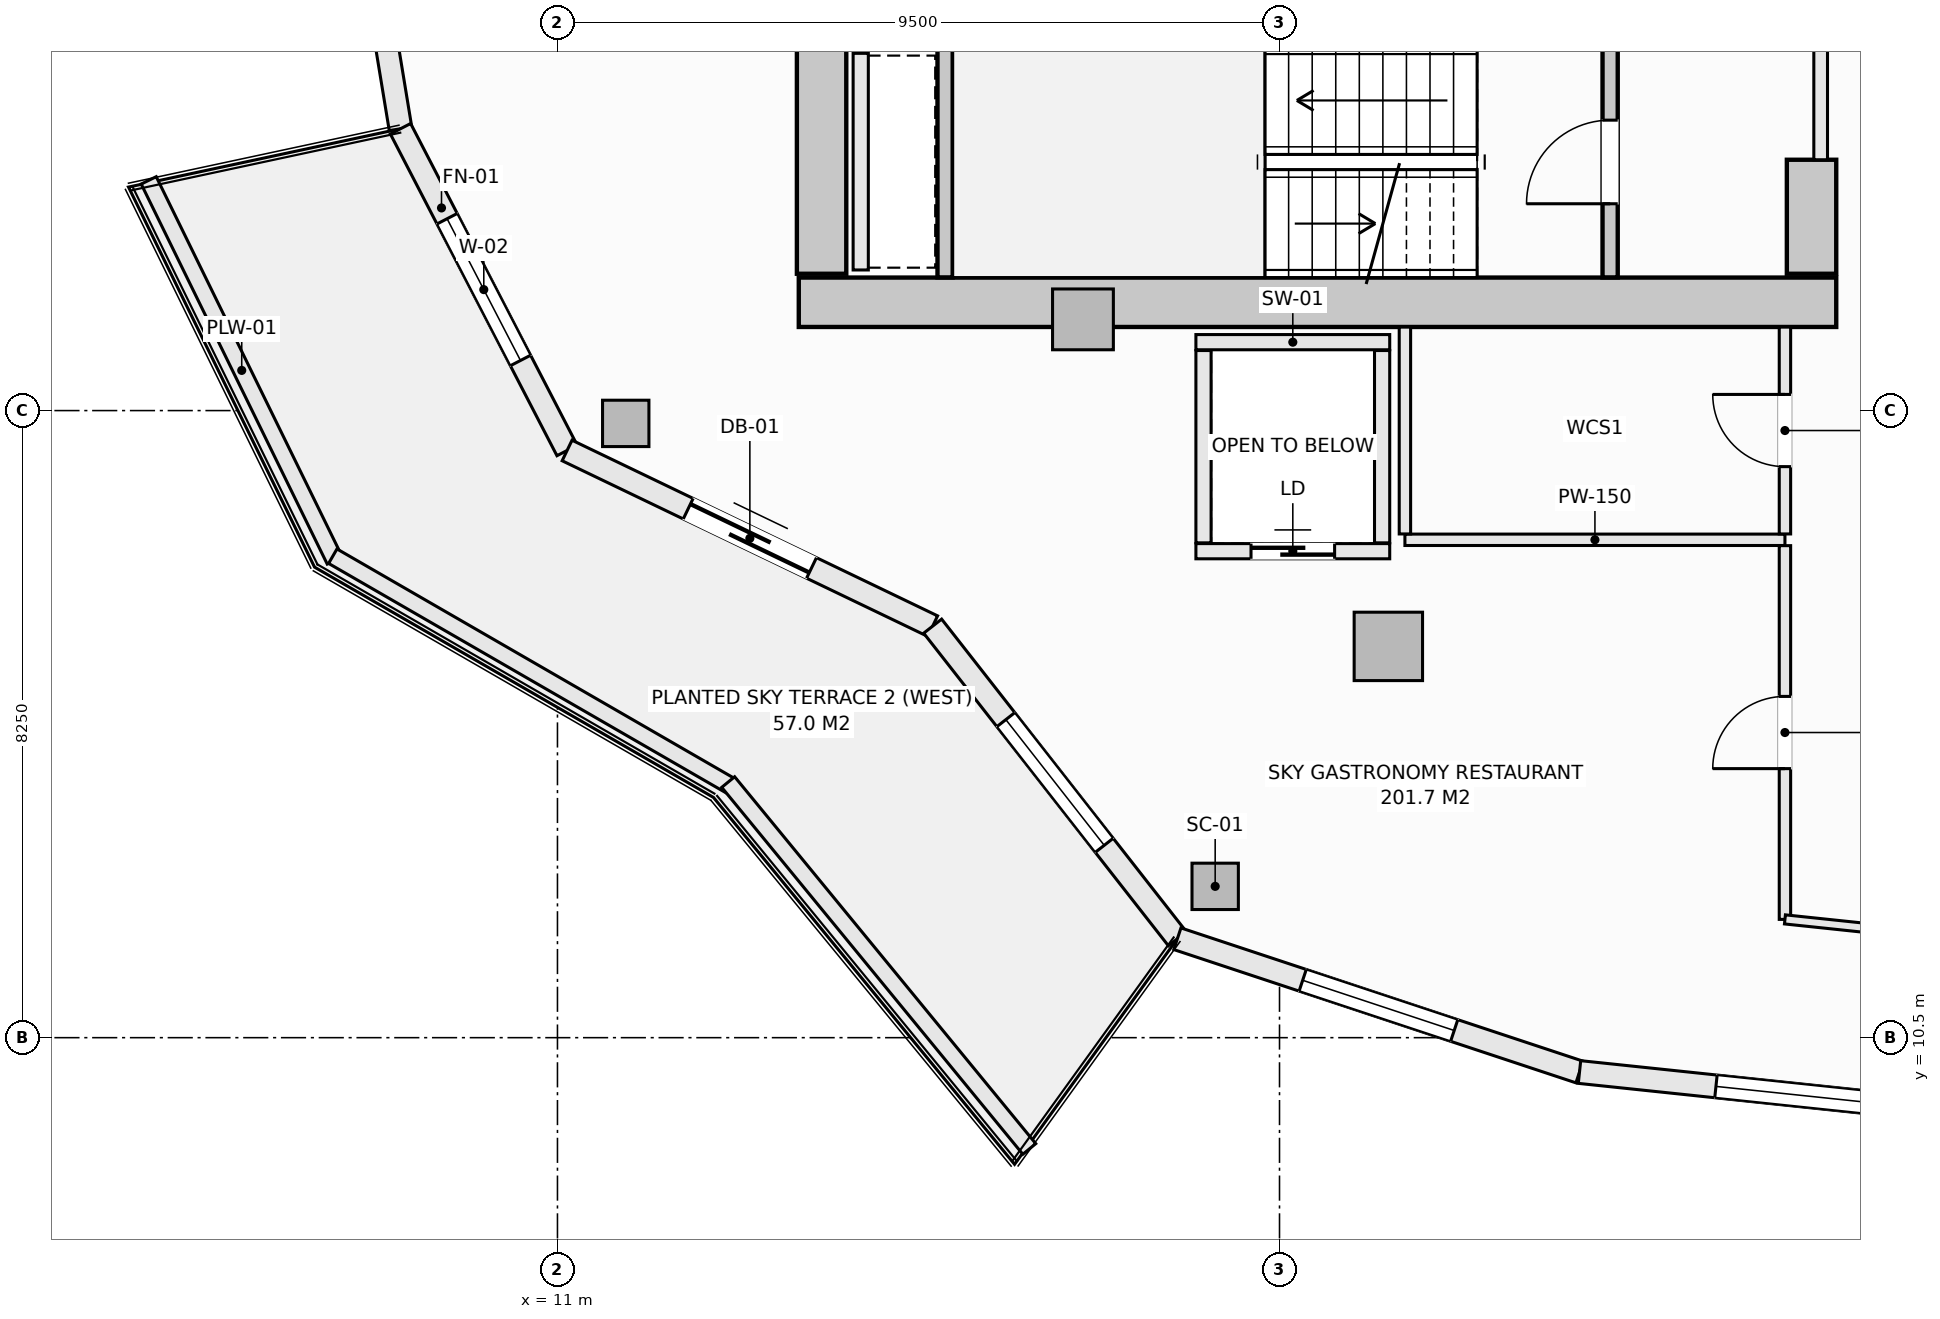
"""IFC4 building model, lengths in metres.
Left out: names, types, materials, properties, quantities, classifications, styles, units other than length and angle.
Written with IfcOpenShell. Run it as: python <this file> out.ifc"""

import sys

from ifc_helpers import new_model, si_unit, direction, frame, frame_2d, origin, origin_2d, place, context, subcontext, project, spatial, rectangle, hollow_rectangle, extrude, element, fill, save


model = new_model("IFC4")
c1 = context("Model", 3, precision=1e-05, world=origin(), true_north=direction((0.0, 1.0)))
c2 = subcontext(c1, "Body", "Model", "MODEL_VIEW")
j1 = project(units=[si_unit("LENGTHUNIT", "METRE"), si_unit("PLANEANGLEUNIT", "RADIAN")], contexts=[c1])
p1 = place(None, origin())
s1 = spatial("IfcSite", under=j1, at=p1, CompositionType="ELEMENT")
p2 = place(p1, origin())
s2 = spatial("IfcBuilding", under=s1, at=p2, CompositionType="ELEMENT")
p3 = place(p2, frame((0.0, 0.0, 180.1)))
s3 = spatial("IfcBuildingStorey", under=s2, at=p3, CompositionType="ELEMENT", Elevation=180.1)
p4 = place(p3, frame((14.175, 20.175, -0.27), z_axis=(0.0, 0.0, 1.0), x_axis=(1.0, 0.0, 0.0)))
e1 = element("IfcWall", 1, at=p4, inside=s3, PredefinedType="SHEAR", context=c2, shape_type="SweptSolid", body=[
    extrude(rectangle(XDim=13.65, YDim=0.65, at=frame_2d((6.825, 0.0))), origin(), (0.0, 0.0, 1.0), 3.4),
])
p5 = place(p3, frame((14.475, 20.55, -0.27), z_axis=(0.0, 0.0, 1.0), x_axis=(0.0, 1.0, 0.0)))
e2 = element("IfcWall", 2, at=p5, inside=s3, PredefinedType="SHEAR", context=c2, shape_type="SweptSolid", body=[
    extrude(rectangle(XDim=12.9, YDim=0.65, at=frame_2d((6.45, 0.0))), origin(), (0.0, 0.0, 1.0), 3.4),
])
p6 = place(p3, frame((27.5, 20.55, -0.27), z_axis=(0.0, 0.0, 1.0), x_axis=(0.0, 1.0, 0.0)))
e3 = element("IfcWall", 3, at=p6, inside=s3, PredefinedType="SHEAR", context=c2, shape_type="SweptSolid", body=[
    extrude(rectangle(XDim=1.5, YDim=0.65, at=frame_2d((0.75, 0.0))), origin(), (0.0, 0.0, 1.0), 3.4),
])
for number, where, z_axis, x_axis in (
    (4, (11.898, 18.581, -0.27), (0.0, 0.0, 1.0), (1.0, 0.0, 0.0)),
    (5, (19.654, 12.49, -0.27), (0.0, 0.0, 1.0), (1.0, 0.0, 0.0)),
):
    element("IfcColumn", number, at=place(p3, frame(where, z_axis=z_axis, x_axis=x_axis)), inside=s3, PredefinedType="COLUMN", context=c2, shape_type="SweptSolid", body=[
        extrude(hollow_rectangle(XDim=0.61, YDim=0.61, WallThickness=0.025, at=origin_2d()), origin(), (0.0, 0.0, 1.0), 3.4),
    ])
p7 = place(p3, frame((21.932, 15.648, -0.27), z_axis=(0.0, 0.0, 1.0), x_axis=(1.0, 0.0, 0.0)))
e6 = element("IfcColumn", 6, at=p7, inside=s3, PredefinedType="COLUMN", context=c2, shape_type="SweptSolid", body=[
    extrude(rectangle(XDim=0.9, YDim=0.9, at=origin_2d()), origin(), (0.0, 0.0, 1.0), 3.4),
])
p8 = place(p3, frame((17.914, 19.95, -0.27), z_axis=(0.0, 0.0, 1.0), x_axis=(1.0, 0.0, 0.0)))
e7 = element("IfcColumn", 7, at=p8, inside=s3, PredefinedType="PILASTER", context=c2, shape_type="SweptSolid", body=[
    extrude(rectangle(XDim=0.8, YDim=0.8, at=origin_2d()), origin(), (0.0, 0.0, 1.0), 3.4),
])
p9 = place(p3, frame((8.188, 27.0, 0.0), z_axis=(0.0, 0.0, 1.0), x_axis=(0.162394765401, -0.986725868806, 0.0)))
e8 = element("IfcWall", 8, at=p9, inside=s3, PredefinedType="SOLIDWALL", context=c2, shape_type="SweptSolid", body=[
    extrude(rectangle(XDim=4.603, YDim=0.3, at=frame_2d((2.302, 0.0))), origin(), (0.0, 0.0, 1.0), 2.653),
])
p10 = place(p9, frame((1.252, 0.0, 0.74)))
e9 = element("IfcOpeningElement", 9, at=p10, cuts=e8, PredefinedType="OPENING", context=c2, shape_type="SweptSolid", body=[
    extrude(rectangle(XDim=2.1, YDim=1.7, at=frame_2d((1.05, 0.85))), frame((0.0, 0.16, 0.0), z_axis=(0.0, -1.0, 0.0), x_axis=(1.0, 0.0, 0.0)), (0.0, 0.0, 1.0), 0.32),
])
p11 = place(p3, frame((8.935, 22.458, 0.0), z_axis=(0.0, 0.0, 1.0), x_axis=(0.459810251451, -0.888017191647, 0.0)))
e10 = element("IfcWall", 10, at=p11, inside=s3, PredefinedType="SOLIDWALL", context=c2, shape_type="SweptSolid", body=[
    extrude(rectangle(XDim=4.766, YDim=0.3, at=frame_2d((2.383, 0.0))), origin(), (0.0, 0.0, 1.0), 2.653),
])
p12 = place(p11, frame((1.333, 0.0, 0.74)))
e11 = element("IfcOpeningElement", 11, at=p12, cuts=e10, PredefinedType="OPENING", context=c2, shape_type="SweptSolid", body=[
    extrude(rectangle(XDim=2.1, YDim=1.7, at=frame_2d((1.05, 0.85))), frame((0.0, 0.16, 0.0), z_axis=(0.0, -1.0, 0.0), x_axis=(1.0, 0.0, 0.0)), (0.0, 0.0, 1.0), 0.32),
])
p13 = place(p3, frame((11.127, 18.225, 0.0), z_axis=(0.0, 0.0, 1.0), x_axis=(0.901353070301, -0.433085029363, 0.0)))
e12 = element("IfcWall", 12, at=p13, inside=s3, PredefinedType="SOLIDWALL", context=c2, shape_type="SweptSolid", body=[
    extrude(rectangle(XDim=5.336, YDim=0.3, at=frame_2d((2.668, 0.0))), origin(), (0.0, 0.0, 1.0), 2.653),
])
p14 = place(p13, frame((1.768, 0.0, 0.0)))
e13 = element("IfcOpeningElement", 13, at=p14, cuts=e12, PredefinedType="OPENING", context=c2, shape_type="SweptSolid", body=[
    extrude(rectangle(XDim=1.8, YDim=2.25, at=frame_2d((0.9, 1.125))), frame((0.0, 0.16, 0.0), z_axis=(0.0, -1.0, 0.0), x_axis=(1.0, 0.0, 0.0)), (0.0, 0.0, 1.0), 0.32),
])
p15 = place(p3, frame((15.937, 15.914, 0.0), z_axis=(0.0, 0.0, 1.0), x_axis=(0.616429245738, -0.787410302828, 0.0)))
e14 = element("IfcWall", 14, at=p15, inside=s3, PredefinedType="SOLIDWALL", context=c2, shape_type="SweptSolid", body=[
    extrude(rectangle(XDim=5.223, YDim=0.3, at=frame_2d((2.612, 0.0))), origin(), (0.0, 0.0, 1.0), 2.653),
])
p16 = place(p15, frame((1.562, 0.0, 0.74)))
e15 = element("IfcOpeningElement", 15, at=p16, cuts=e14, PredefinedType="OPENING", context=c2, shape_type="SweptSolid", body=[
    extrude(rectangle(XDim=2.1, YDim=1.7, at=frame_2d((1.05, 0.85))), frame((0.0, 0.16, 0.0), z_axis=(0.0, -1.0, 0.0), x_axis=(1.0, 0.0, 0.0)), (0.0, 0.0, 1.0), 0.32),
])
p17 = place(p3, frame((19.156, 11.801, 0.0), z_axis=(0.0, 0.0, 1.0), x_axis=(0.949246811547, -0.314532177636, 0.0)))
e16 = element("IfcWall", 16, at=p17, inside=s3, PredefinedType="SOLIDWALL", context=c2, shape_type="SweptSolid", body=[
    extrude(rectangle(XDim=5.574, YDim=0.3, at=frame_2d((2.787, 0.0))), origin(), (0.0, 0.0, 1.0), 2.653),
])
p18 = place(p17, frame((1.737, 0.0, 0.74)))
e17 = element("IfcOpeningElement", 17, at=p18, cuts=e16, PredefinedType="OPENING", context=c2, shape_type="SweptSolid", body=[
    extrude(rectangle(XDim=2.1, YDim=1.7, at=frame_2d((1.05, 0.85))), frame((0.0, 0.16, 0.0), z_axis=(0.0, -1.0, 0.0), x_axis=(1.0, 0.0, 0.0)), (0.0, 0.0, 1.0), 0.32),
])
p19 = place(p3, frame((24.447, 10.048, 0.0), z_axis=(0.0, 0.0, 1.0), x_axis=(0.994496545245, -0.104769372887, 0.0)))
e18 = element("IfcWall", 18, at=p19, inside=s3, PredefinedType="SOLIDWALL", context=c2, shape_type="SweptSolid", body=[
    extrude(rectangle(XDim=5.709, YDim=0.3, at=frame_2d((2.854, 0.0))), origin(), (0.0, 0.0, 1.0), 2.653),
])
p20 = place(p19, frame((1.805, 0.0, 0.74)))
e19 = element("IfcOpeningElement", 19, at=p20, cuts=e18, PredefinedType="OPENING", context=c2, shape_type="SweptSolid", body=[
    extrude(rectangle(XDim=2.1, YDim=1.7, at=frame_2d((1.05, 0.85))), frame((0.0, 0.16, 0.0), z_axis=(0.0, -1.0, 0.0), x_axis=(1.0, 0.0, 0.0)), (0.0, 0.0, 1.0), 0.32),
])
p21 = place(p3, frame((5.622, 21.779, 0.0), z_axis=(0.0, 0.0, 1.0), x_axis=(0.439637174641, -0.898175458735, 0.0)))
e20 = element("IfcWall", 20, at=p21, inside=s3, PredefinedType="PARAPET", context=c2, shape_type="SweptSolid", body=[
    extrude(rectangle(XDim=5.567, YDim=0.22, at=frame_2d((2.784, 0.0))), origin(), (0.0, 0.0, 1.0), 0.52),
])
p22 = place(p3, frame((8.044, 16.834, 0.0), z_axis=(0.0, 0.0, 1.0), x_axis=(0.866058128659, -0.499943314571, 0.0)))
e21 = element("IfcWall", 21, at=p22, inside=s3, PredefinedType="PARAPET", context=c2, shape_type="SweptSolid", body=[
    extrude(rectangle(XDim=6.06, YDim=0.22, at=frame_2d((3.03, 0.0))), origin(), (0.0, 0.0, 1.0), 0.52),
])
p23 = place(p3, frame((13.246, 13.863, 0.0), z_axis=(0.0, 0.0, 1.0), x_axis=(0.634429234628, -0.77298094818, 0.0)))
e22 = element("IfcWall", 22, at=p23, inside=s3, PredefinedType="PARAPET", context=c2, shape_type="SweptSolid", body=[
    extrude(rectangle(XDim=6.245, YDim=0.22, at=frame_2d((3.123, 0.0))), origin(), (0.0, 0.0, 1.0), 0.52),
])
p24 = place(p3, frame((24.85, 20.502, -0.27), z_axis=(0.0, 0.0, 1.0), x_axis=(0.0, 1.0, 0.0)))
e23 = element("IfcWall", 23, at=p24, inside=s3, PredefinedType="SHEAR", context=c2, shape_type="SweptSolid", body=[
    extrude(rectangle(XDim=3.038, YDim=0.2, at=frame_2d((1.519, 0.0))), origin(), (0.0, 0.0, 1.0), 3.4),
])
p25 = place(p24, frame((0.969, 0.0, 0.27)))
e24 = element("IfcOpeningElement", 24, at=p25, cuts=e23, PredefinedType="OPENING", context=c2, shape_type="SweptSolid", body=[
    extrude(rectangle(XDim=1.1, YDim=2.15, at=frame_2d((0.55, 1.075))), frame((0.0, 0.11, 0.0), z_axis=(0.0, -1.0, 0.0), x_axis=(1.0, 0.0, 0.0)), (0.0, 0.0, 1.0), 0.22),
])
p26 = place(p3, frame((16.1, 20.502, -0.27), z_axis=(0.0, 0.0, 1.0), x_axis=(0.0, 1.0, 0.0)))
e25 = element("IfcWall", 25, at=p26, inside=s3, PredefinedType="SHEAR", context=c2, shape_type="SweptSolid", body=[
    extrude(rectangle(XDim=3.036, YDim=0.2, at=frame_2d((1.518, 0.0))), origin(), (0.0, 0.0, 1.0), 3.4),
])
p27 = place(p3, frame((19.4, 19.65, 0.0), z_axis=(0.0, 0.0, 1.0), x_axis=(1.0, 0.0, 0.0)))
e26 = element("IfcWall", 26, at=p27, inside=s3, PredefinedType="SOLIDWALL", context=c2, shape_type="SweptSolid", body=[
    extrude(rectangle(XDim=2.55, YDim=0.2, at=frame_2d((1.275, 0.0))), origin(), (0.0, 0.0, 1.0), 3.13),
])
p28 = place(p3, frame((19.4, 16.9, 0.0), z_axis=(0.0, 0.0, 1.0), x_axis=(1.0, 0.0, 0.0)))
e27 = element("IfcWall", 27, at=p28, inside=s3, PredefinedType="SOLIDWALL", context=c2, shape_type="SweptSolid", body=[
    extrude(rectangle(XDim=2.55, YDim=0.2, at=frame_2d((1.275, 0.0))), origin(), (0.0, 0.0, 1.0), 3.13),
])
p29 = place(p28, frame((0.725, 0.0, 0.0)))
e28 = element("IfcOpeningElement", 28, at=p29, cuts=e27, PredefinedType="OPENING", context=c2, shape_type="SweptSolid", body=[
    extrude(rectangle(XDim=1.1, YDim=2.2, at=frame_2d((0.55, 1.1))), frame((0.0, 0.11, 0.0), z_axis=(0.0, -1.0, 0.0), x_axis=(1.0, 0.0, 0.0)), (0.0, 0.0, 1.0), 0.22),
])
for number, where, z_axis, x_axis in (
    (29, (19.5, 17.01, 0.0), (0.0, 0.0, 1.0), (0.0, 1.0, 0.0)),
    (30, (21.85, 17.01, 0.0), (0.0, 0.0, 1.0), (0.0, 1.0, 0.0)),
):
    element("IfcWall", number, at=place(p3, frame(where, z_axis=z_axis, x_axis=x_axis)), inside=s3, PredefinedType="SOLIDWALL", context=c2, shape_type="SweptSolid", body=[
        extrude(rectangle(XDim=2.53, YDim=0.2, at=frame_2d((1.265, 0.0))), origin(), (0.0, 0.0, 1.0), 3.13),
    ])
p30 = place(p3, frame((14.99, 20.6, 0.0), z_axis=(0.0, 0.0, 1.0), x_axis=(0.0, 1.0, 0.0)))
e31 = element("IfcWall", 31, at=p30, inside=s3, PredefinedType="SOLIDWALL", context=c2, shape_type="SweptSolid", body=[
    extrude(rectangle(XDim=2.85, YDim=0.2, at=frame_2d((1.425, 0.0))), origin(), (0.0, 0.0, 1.0), 3.13),
])
p31 = place(p3, frame((27.62, 22.05, 0.0), z_axis=(0.0, 0.0, 1.0), x_axis=(0.0, 1.0, 0.0)))
e32 = element("IfcWall", 32, at=p31, inside=s3, PredefinedType="SOLIDWALL", context=c2, shape_type="SweptSolid", body=[
    extrude(rectangle(XDim=9.9, YDim=0.18, at=frame_2d((4.95, 0.0))), origin(), (0.0, 0.0, 1.0), 3.13),
])
p32 = place(p31, frame((4.475, 0.0, 0.0)))
e33 = element("IfcOpeningElement", 33, at=p32, cuts=e32, PredefinedType="OPENING", context=c2, shape_type="SweptSolid", body=[
    extrude(rectangle(XDim=0.95, YDim=2.1, at=frame_2d((0.475, 1.05))), frame((0.0, 0.1, 0.0), z_axis=(0.0, -1.0, 0.0), x_axis=(1.0, 0.0, 0.0)), (0.0, 0.0, 1.0), 0.2),
])
p33 = place(p31, frame((6.89, 0.0, 0.0)))
e34 = element("IfcOpeningElement", 34, at=p33, cuts=e32, PredefinedType="OPENING", context=c2, shape_type="SweptSolid", body=[
    extrude(rectangle(XDim=1.5, YDim=2.2, at=frame_2d((0.75, 1.1))), frame((0.0, 0.1, 0.0), z_axis=(0.0, -1.0, 0.0), x_axis=(1.0, 0.0, 0.0)), (0.0, 0.0, 1.0), 0.2),
])
p34 = place(p31, frame((1.51, 0.0, 0.0)))
e35 = element("IfcOpeningElement", 35, at=p34, cuts=e32, PredefinedType="OPENING", context=c2, shape_type="SweptSolid", body=[
    extrude(rectangle(XDim=1.5, YDim=2.2, at=frame_2d((0.75, 1.1))), frame((0.0, 0.1, 0.0), z_axis=(0.0, -1.0, 0.0), x_axis=(1.0, 0.0, 0.0)), (0.0, 0.0, 1.0), 0.2),
])
p35 = place(p3, frame((22.15, 17.05, 0.0), z_axis=(0.0, 0.0, 1.0), x_axis=(1.0, 0.0, 0.0)))
e36 = element("IfcWall", 36, at=p35, inside=s3, PredefinedType="PARTITIONING", context=c2, shape_type="SweptSolid", body=[
    extrude(rectangle(XDim=5.0, YDim=0.15, at=frame_2d((2.5, 0.0))), origin(), (0.0, 0.0, 1.0), 3.13),
])
p36 = place(p3, frame((22.15, 17.127, 0.0), z_axis=(0.0, 0.0, 1.0), x_axis=(0.0, 1.0, 0.0)))
e37 = element("IfcWall", 37, at=p36, inside=s3, PredefinedType="PARTITIONING", context=c2, shape_type="SweptSolid", body=[
    extrude(rectangle(XDim=2.721, YDim=0.15, at=frame_2d((1.36, 0.0))), origin(), (0.0, 0.0, 1.0), 3.13),
])
p37 = place(p3, frame((27.15, 12.056, 0.0), z_axis=(0.0, 0.0, 1.0), x_axis=(0.0, 1.0, 0.0)))
e38 = element("IfcWall", 38, at=p37, inside=s3, PredefinedType="PARTITIONING", context=c2, shape_type="SweptSolid", body=[
    extrude(rectangle(XDim=4.917, YDim=0.15, at=frame_2d((2.458, 0.0))), origin(), (0.0, 0.0, 1.0), 3.13),
])
p38 = place(p37, frame((1.983, 0.0, 0.0)))
e39 = element("IfcOpeningElement", 39, at=p38, cuts=e38, PredefinedType="OPENING", context=c2, shape_type="SweptSolid", body=[
    extrude(rectangle(XDim=0.95, YDim=2.1, at=frame_2d((0.475, 1.05))), frame((0.0, 0.085, 0.0), z_axis=(0.0, -1.0, 0.0), x_axis=(1.0, 0.0, 0.0)), (0.0, 0.0, 1.0), 0.17),
])
p39 = place(p3, frame((27.15, 17.127, 0.0), z_axis=(0.0, 0.0, 1.0), x_axis=(0.0, 1.0, 0.0)))
e40 = element("IfcWall", 40, at=p39, inside=s3, PredefinedType="PARTITIONING", context=c2, shape_type="SweptSolid", body=[
    extrude(rectangle(XDim=2.721, YDim=0.15, at=frame_2d((1.36, 0.0))), origin(), (0.0, 0.0, 1.0), 3.13),
])
p40 = place(p39, frame((0.885, 0.0, 0.0)))
e41 = element("IfcOpeningElement", 41, at=p40, cuts=e40, PredefinedType="OPENING", context=c2, shape_type="SweptSolid", body=[
    extrude(rectangle(XDim=0.95, YDim=2.1, at=frame_2d((0.475, 1.05))), frame((0.0, 0.085, 0.0), z_axis=(0.0, -1.0, 0.0), x_axis=(1.0, 0.0, 0.0)), (0.0, 0.0, 1.0), 0.17),
])
p41 = place(p3, frame((27.15, 12.056, 0.0), z_axis=(0.0, 0.0, 1.0), x_axis=(0.994501330468, -0.104723940422, 0.0)))
e42 = element("IfcWall", 42, at=p41, inside=s3, PredefinedType="PARTITIONING", context=c2, shape_type="SweptSolid", body=[
    extrude(rectangle(XDim=2.921, YDim=0.12, at=frame_2d((1.46, 0.0))), origin(), (0.0, 0.0, 1.0), 3.13),
])
p42 = place(p12, origin())
e43 = element("IfcWindow", 43, at=p42, inside=s3, PartitioningType="SINGLE_PANEL", PredefinedType="WINDOW", context=c2, shape_type="SweptSolid", body=[
    extrude(rectangle(XDim=2.1, YDim=1.7, at=frame_2d((1.05, 0.85))), frame((0.0, 0.03, 0.0), z_axis=(0.0, -1.0, 0.0), x_axis=(1.0, 0.0, 0.0)), (0.0, 0.0, 1.0), 0.06),
])
fill(e11, e43)
p43 = place(p14, frame((1.8, 0.0, 0.0), z_axis=(0.0, 0.0, 1.0), x_axis=(-1.0, 0.0, 0.0)))
e44 = element("IfcDoor", 44, at=p43, inside=s3, OperationType="SLIDING_TO_LEFT", PredefinedType="DOOR", context=c2, shape_type="SweptSolid", body=[
    extrude(rectangle(XDim=1.8, YDim=2.25, at=frame_2d((0.9, 1.125))), frame((0.0, 0.025, 0.0), z_axis=(0.0, -1.0, 0.0), x_axis=(1.0, 0.0, 0.0)), (0.0, 0.0, 1.0), 0.05),
])
fill(e13, e44)
p44 = place(p16, origin())
e45 = element("IfcWindow", 45, at=p44, inside=s3, PartitioningType="SINGLE_PANEL", PredefinedType="WINDOW", context=c2, shape_type="SweptSolid", body=[
    extrude(rectangle(XDim=2.1, YDim=1.7, at=frame_2d((1.05, 0.85))), frame((0.0, 0.03, 0.0), z_axis=(0.0, -1.0, 0.0), x_axis=(1.0, 0.0, 0.0)), (0.0, 0.0, 1.0), 0.06),
])
fill(e15, e45)
p45 = place(p18, origin())
e46 = element("IfcWindow", 46, at=p45, inside=s3, PartitioningType="SINGLE_PANEL", PredefinedType="WINDOW", context=c2, shape_type="SweptSolid", body=[
    extrude(rectangle(XDim=2.1, YDim=1.7, at=frame_2d((1.05, 0.85))), frame((0.0, 0.03, 0.0), z_axis=(0.0, -1.0, 0.0), x_axis=(1.0, 0.0, 0.0)), (0.0, 0.0, 1.0), 0.06),
])
fill(e17, e46)
p46 = place(p20, origin())
e47 = element("IfcWindow", 47, at=p46, inside=s3, PartitioningType="SINGLE_PANEL", PredefinedType="WINDOW", context=c2, shape_type="SweptSolid", body=[
    extrude(rectangle(XDim=2.1, YDim=1.7, at=frame_2d((1.05, 0.85))), frame((0.0, 0.03, 0.0), z_axis=(0.0, -1.0, 0.0), x_axis=(1.0, 0.0, 0.0)), (0.0, 0.0, 1.0), 0.06),
])
fill(e19, e47)
p47 = place(p25, origin())
e48 = element("IfcDoor", 48, at=p47, inside=s3, OperationType="SINGLE_SWING_LEFT", PredefinedType="DOOR", context=c2, shape_type="SweptSolid", body=[
    extrude(rectangle(XDim=1.1, YDim=2.15, at=frame_2d((0.55, 1.075))), frame((0.0, 0.025, 0.0), z_axis=(0.0, -1.0, 0.0), x_axis=(1.0, 0.0, 0.0)), (0.0, 0.0, 1.0), 0.05),
])
fill(e24, e48)
p48 = place(p29, origin())
e49 = element("IfcDoor", 49, at=p48, inside=s3, OperationType="SLIDING_TO_LEFT", PredefinedType="DOOR", context=c2, shape_type="SweptSolid", body=[
    extrude(rectangle(XDim=1.1, YDim=2.2, at=frame_2d((0.55, 1.1))), frame((0.0, 0.025, 0.0), z_axis=(0.0, -1.0, 0.0), x_axis=(1.0, 0.0, 0.0)), (0.0, 0.0, 1.0), 0.05),
])
fill(e28, e49)
p49 = place(p40, origin())
e50 = element("IfcDoor", 50, at=p49, inside=s3, OperationType="SINGLE_SWING_RIGHT", PredefinedType="DOOR", context=c2, shape_type="SweptSolid", body=[
    extrude(rectangle(XDim=0.95, YDim=2.1, at=frame_2d((0.475, 1.05))), frame((0.0, 0.025, 0.0), z_axis=(0.0, -1.0, 0.0), x_axis=(1.0, 0.0, 0.0)), (0.0, 0.0, 1.0), 0.05),
])
fill(e41, e50)
p50 = place(p38, origin())
e51 = element("IfcDoor", 51, at=p50, inside=s3, OperationType="SINGLE_SWING_LEFT", PredefinedType="DOOR", context=c2, shape_type="SweptSolid", body=[
    extrude(rectangle(XDim=0.95, YDim=2.1, at=frame_2d((0.475, 1.05))), frame((0.0, 0.025, 0.0), z_axis=(0.0, -1.0, 0.0), x_axis=(1.0, 0.0, 0.0)), (0.0, 0.0, 1.0), 0.05),
])
fill(e39, e51)
save(model, sys.argv[1])
